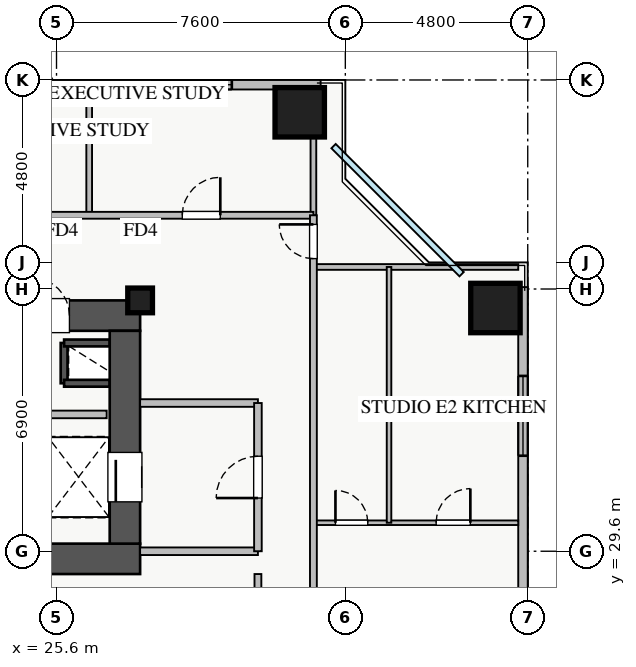
"""IFC4 building model, lengths in metres.
Left out: names, types, materials, properties, quantities, classifications, styles, units other than length and angle.
Written with IfcOpenShell. Run it as: python <this file> out.ifc"""

import sys

from ifc_helpers import new_model, si_unit, direction, frame, frame_2d, origin, origin_2d, place, context, subcontext, project, spatial, rectangle, extrude, source, transform, mapped, element, fill, save


model = new_model("IFC4")
c1 = context("Model", 3, precision=1e-05, world=origin(), true_north=direction((0.0, 1.0)))
c2 = subcontext(c1, "Body", "Model", "MODEL_VIEW")
j1 = project(units=[si_unit("LENGTHUNIT", "METRE"), si_unit("PLANEANGLEUNIT", "RADIAN")], contexts=[c1])
p1 = place(None, origin())
s1 = spatial("IfcSite", under=j1, at=p1, CompositionType="ELEMENT")
p2 = place(p1, origin())
s2 = spatial("IfcBuilding", under=s1, at=p2, CompositionType="ELEMENT")
p3 = place(p2, frame((0.0, 0.0, 63.25)))
s3 = spatial("IfcBuildingStorey", under=s2, at=p3, CompositionType="ELEMENT", Elevation=63.25)
p4 = place(p3, frame((25.8, 34.02, 0.0), z_axis=(0.0, 0.0, 1.0), x_axis=(0.0, 1.0, 0.0)))
e1 = element("IfcWall", 1, at=p4, inside=s3, PredefinedType="SHEAR", context=c2, shape_type="SweptSolid", body=[
    extrude(rectangle(XDim=1.06, YDim=0.18, at=frame_2d((0.53, 0.0))), origin(), (0.0, 0.0, 1.0), 3.07),
])
for number, where, z_axis, x_axis in (
    (2, (25.8, 35.08, 0.0), (0.0, 0.0, 1.0), (1.0, 0.0, 0.0)),
    (3, (25.8, 34.02, 0.0), (0.0, 0.0, 1.0), (1.0, 0.0, 0.0)),
):
    element("IfcWall", number, at=place(p3, frame(where, z_axis=z_axis, x_axis=x_axis)), inside=s3, PredefinedType="SHEAR", context=c2, shape_type="SweptSolid", body=[
        extrude(rectangle(XDim=1.2, YDim=0.18, at=frame_2d((0.6, 0.0))), origin(), (0.0, 0.0, 1.0), 3.07),
    ])
p5 = place(p3, frame((10.2, 29.4, 0.0), z_axis=(0.0, 0.0, 1.0), x_axis=(1.0, 0.0, 0.0)))
e4 = element("IfcWall", 4, at=p5, inside=s3, PredefinedType="SHEAR", context=c2, shape_type="SweptSolid", body=[
    extrude(rectangle(XDim=17.6, YDim=0.8, at=frame_2d((8.8, 0.0))), origin(), (0.0, 0.0, 1.0), 3.25),
])
p6 = place(p3, frame((10.2, 35.8, 0.0), z_axis=(0.0, 0.0, 1.0), x_axis=(1.0, 0.0, 0.0)))
e5 = element("IfcWall", 5, at=p6, inside=s3, PredefinedType="SHEAR", context=c2, shape_type="SweptSolid", body=[
    extrude(rectangle(XDim=17.6, YDim=0.8, at=frame_2d((8.8, 0.0))), origin(), (0.0, 0.0, 1.0), 3.25),
])
p7 = place(p6, frame((1.15, 0.0, 0.0)))
e6 = element("IfcOpeningElement", 6, at=p7, cuts=e5, PredefinedType="OPENING", context=c2, shape_type="SweptSolid", body=[
    extrude(rectangle(XDim=1.1, YDim=2.05, at=frame_2d((0.55, 1.025))), frame((0.0, 0.41, 0.0), z_axis=(0.0, -1.0, 0.0), x_axis=(1.0, 0.0, 0.0)), (0.0, 0.0, 1.0), 0.82),
])
p8 = place(p6, frame((8.3, 0.0, 0.0)))
e7 = element("IfcOpeningElement", 7, at=p8, cuts=e5, PredefinedType="OPENING", context=c2, shape_type="SweptSolid", body=[
    extrude(rectangle(XDim=1.1, YDim=2.05, at=frame_2d((0.55, 1.025))), frame((0.0, 0.41, 0.0), z_axis=(0.0, -1.0, 0.0), x_axis=(1.0, 0.0, 0.0)), (0.0, 0.0, 1.0), 0.82),
])
p9 = place(p6, frame((10.05, 0.0, 0.0)))
e8 = element("IfcOpeningElement", 8, at=p9, cuts=e5, PredefinedType="OPENING", context=c2, shape_type="SweptSolid", body=[
    extrude(rectangle(XDim=1.1, YDim=2.05, at=frame_2d((0.55, 1.025))), frame((0.0, 0.41, 0.0), z_axis=(0.0, -1.0, 0.0), x_axis=(1.0, 0.0, 0.0)), (0.0, 0.0, 1.0), 0.82),
])
p10 = place(p6, frame((14.74, 0.0, 0.0)))
e9 = element("IfcOpeningElement", 9, at=p10, cuts=e5, PredefinedType="OPENING", context=c2, shape_type="SweptSolid", body=[
    extrude(rectangle(XDim=1.0, YDim=2.05, at=frame_2d((0.5, 1.025))), frame((0.0, 0.41, 0.0), z_axis=(0.0, -1.0, 0.0), x_axis=(1.0, 0.0, 0.0)), (0.0, 0.0, 1.0), 0.82),
])
p11 = place(p6, frame((11.95, 0.0, 0.0)))
e10 = element("IfcOpeningElement", 10, at=p11, cuts=e5, PredefinedType="OPENING", context=c2, shape_type="SweptSolid", body=[
    extrude(rectangle(XDim=1.0, YDim=2.05, at=frame_2d((0.5, 1.025))), frame((0.0, 0.41, 0.0), z_axis=(0.0, -1.0, 0.0), x_axis=(1.0, 0.0, 0.0)), (0.0, 0.0, 1.0), 0.82),
])
p12 = place(p6, frame((13.485, 0.0, 0.0)))
e11 = element("IfcOpeningElement", 11, at=p12, cuts=e5, PredefinedType="OPENING", context=c2, shape_type="SweptSolid", body=[
    extrude(rectangle(XDim=1.0, YDim=2.05, at=frame_2d((0.5, 1.025))), frame((0.0, 0.41, 0.0), z_axis=(0.0, -1.0, 0.0), x_axis=(1.0, 0.0, 0.0)), (0.0, 0.0, 1.0), 0.82),
])
p13 = place(p3, frame((27.4, 29.8, 0.0), z_axis=(0.0, 0.0, 1.0), x_axis=(0.0, 1.0, 0.0)))
e12 = element("IfcWall", 12, at=p13, inside=s3, PredefinedType="SHEAR", context=c2, shape_type="SweptSolid", body=[
    extrude(rectangle(XDim=5.6, YDim=0.8, at=frame_2d((2.8, 0.0))), origin(), (0.0, 0.0, 1.0), 3.25),
])
p14 = place(p13, frame((1.1, 0.0, 0.0)))
e13 = element("IfcOpeningElement", 13, at=p14, cuts=e12, PredefinedType="OPENING", context=c2, shape_type="SweptSolid", body=[
    extrude(rectangle(XDim=1.3, YDim=2.05, at=frame_2d((0.65, 1.025))), frame((0.0, 0.41, 0.0), z_axis=(0.0, -1.0, 0.0), x_axis=(1.0, 0.0, 0.0)), (0.0, 0.0, 1.0), 0.82),
])
m1 = source(origin(), c2, "Body", "SweptSolid", [
    extrude(rectangle(XDim=0.65, YDim=0.65, at=origin_2d()), origin(), (0.0, 0.0, 1.0), 3.25),
])
p15 = place(p3, frame((27.8, 36.2, 0.0), z_axis=(0.0, 0.0, 1.0), x_axis=(1.0, 0.0, 0.0)))
e14 = element("IfcColumn", 14, at=p15, inside=s3, PredefinedType="PILASTER", context=c2, shape_type="MappedRepresentation", body=[
    mapped(m1, transform((0.0, 0.0, 0.0), x_axis=(1.0, 0.0, 0.0), y_axis=(0.0, 1.0, 0.0), z_axis=(0.0, 0.0, 1.0), scale=1.0)),
])
m2 = source(origin(), c2, "Body", "SweptSolid", [
    extrude(rectangle(XDim=1.3, YDim=1.3, at=origin_2d()), origin(), (0.0, 0.0, 1.0), 3.25),
])
for number, where, z_axis, x_axis in (
    (15, (37.15, 36.0, 0.0), (0.0, 0.0, 1.0), (1.0, 0.0, 0.0)),
    (16, (32.0, 41.15, 0.0), (0.0, 0.0, 1.0), (1.0, 0.0, 0.0)),
):
    element("IfcColumn", number, at=place(p3, frame(where, z_axis=z_axis, x_axis=x_axis)), inside=s3, PredefinedType="COLUMN", context=c2, shape_type="MappedRepresentation", body=[
        mapped(m2, transform((0.0, 0.0, 0.0), x_axis=(1.0, 0.0, 0.0), y_axis=(0.0, 1.0, 0.0), z_axis=(0.0, 0.0, 1.0), scale=1.0)),
    ])
p16 = place(p3, frame((5.45, 41.875, 0.0), z_axis=(0.0, 0.0, 1.0), x_axis=(1.0, 0.0, 0.0)))
e17 = element("IfcWall", 17, at=p16, inside=s3, PredefinedType="STANDARD", context=c2, shape_type="SweptSolid", body=[
    extrude(rectangle(XDim=27.1, YDim=0.25, at=frame_2d((13.55, 0.0))), origin(), (0.0, 0.0, 1.0), 2.61),
])
p17 = place(p16, frame((14.4, 0.0, 0.0)))
e18 = element("IfcOpeningElement", 18, at=p17, cuts=e17, PredefinedType="OPENING", context=c2, shape_type="SweptSolid", body=[
    extrude(rectangle(XDim=1.2, YDim=2.1, at=frame_2d((0.6, 1.05))), frame((0.0, 0.135, 0.0), z_axis=(0.0, -1.0, 0.0), x_axis=(1.0, 0.0, 0.0)), (0.0, 0.0, 1.0), 0.27),
])
p18 = place(p16, frame((1.465, 0.0, 0.9)))
e19 = element("IfcOpeningElement", 19, at=p18, cuts=e17, PredefinedType="OPENING", context=c2, shape_type="SweptSolid", body=[
    extrude(rectangle(XDim=1.5, YDim=1.5, at=frame_2d((0.75, 0.75))), frame((0.0, 0.135, 0.0), z_axis=(0.0, -1.0, 0.0), x_axis=(1.0, 0.0, 0.0)), (0.0, 0.0, 1.0), 0.27),
])
p19 = place(p16, frame((9.263, 0.0, 0.9)))
e20 = element("IfcOpeningElement", 20, at=p19, cuts=e17, PredefinedType="OPENING", context=c2, shape_type="SweptSolid", body=[
    extrude(rectangle(XDim=1.8, YDim=1.45, at=frame_2d((0.9, 0.725))), frame((0.0, 0.135, 0.0), z_axis=(0.0, -1.0, 0.0), x_axis=(1.0, 0.0, 0.0)), (0.0, 0.0, 1.0), 0.27),
])
p20 = place(p16, frame((17.93, 0.0, 0.9)))
e21 = element("IfcOpeningElement", 21, at=p20, cuts=e17, PredefinedType="OPENING", context=c2, shape_type="SweptSolid", body=[
    extrude(rectangle(XDim=1.5, YDim=1.5, at=frame_2d((0.75, 0.75))), frame((0.0, 0.135, 0.0), z_axis=(0.0, -1.0, 0.0), x_axis=(1.0, 0.0, 0.0)), (0.0, 0.0, 1.0), 0.27),
])
p21 = place(p16, frame((22.663, 0.0, 0.9)))
e22 = element("IfcOpeningElement", 22, at=p21, cuts=e17, PredefinedType="OPENING", context=c2, shape_type="SweptSolid", body=[
    extrude(rectangle(XDim=2.1, YDim=1.48, at=frame_2d((1.05, 0.74))), frame((0.0, 0.135, 0.0), z_axis=(0.0, -1.0, 0.0), x_axis=(1.0, 0.0, 0.0)), (0.0, 0.0, 1.0), 0.27),
])
p22 = place(p16, frame((4.63, 0.0, 0.9)))
e23 = element("IfcOpeningElement", 23, at=p22, cuts=e17, PredefinedType="OPENING", context=c2, shape_type="SweptSolid", body=[
    extrude(rectangle(XDim=2.4, YDim=1.5, at=frame_2d((1.2, 0.75))), frame((0.0, 0.135, 0.0), z_axis=(0.0, -1.0, 0.0), x_axis=(1.0, 0.0, 0.0)), (0.0, 0.0, 1.0), 0.27),
])
p23 = place(p3, frame((37.875, 9.45, 0.0), z_axis=(0.0, 0.0, 1.0), x_axis=(0.0, 1.0, 0.0)))
e24 = element("IfcWall", 24, at=p23, inside=s3, PredefinedType="STANDARD", context=c2, shape_type="SweptSolid", body=[
    extrude(rectangle(XDim=27.1, YDim=0.25, at=frame_2d((13.55, 0.0))), origin(), (0.0, 0.0, 1.0), 2.61),
])
p24 = place(p23, frame((14.4, 0.0, 0.0)))
e25 = element("IfcOpeningElement", 25, at=p24, cuts=e24, PredefinedType="OPENING", context=c2, shape_type="SweptSolid", body=[
    extrude(rectangle(XDim=1.2, YDim=2.1, at=frame_2d((0.6, 1.05))), frame((0.0, 0.135, 0.0), z_axis=(0.0, -1.0, 0.0), x_axis=(1.0, 0.0, 0.0)), (0.0, 0.0, 1.0), 0.27),
])
p25 = place(p23, frame((2.188, 0.0, 0.9)))
e26 = element("IfcOpeningElement", 26, at=p25, cuts=e24, PredefinedType="OPENING", context=c2, shape_type="SweptSolid", body=[
    extrude(rectangle(XDim=2.4, YDim=1.48, at=frame_2d((1.2, 0.74))), frame((0.0, 0.135, 0.0), z_axis=(0.0, -1.0, 0.0), x_axis=(1.0, 0.0, 0.0)), (0.0, 0.0, 1.0), 0.27),
])
p26 = place(p23, frame((22.663, 0.0, 0.9)))
e27 = element("IfcOpeningElement", 27, at=p26, cuts=e24, PredefinedType="OPENING", context=c2, shape_type="SweptSolid", body=[
    extrude(rectangle(XDim=2.1, YDim=1.48, at=frame_2d((1.05, 0.74))), frame((0.0, 0.135, 0.0), z_axis=(0.0, -1.0, 0.0), x_axis=(1.0, 0.0, 0.0)), (0.0, 0.0, 1.0), 0.27),
])
p27 = place(p23, frame((13.235, 0.0, 0.9)))
e28 = element("IfcOpeningElement", 28, at=p27, cuts=e24, PredefinedType="OPENING", context=c2, shape_type="SweptSolid", body=[
    extrude(rectangle(XDim=0.9, YDim=1.2, at=frame_2d((0.45, 0.6))), frame((0.0, 0.135, 0.0), z_axis=(0.0, -1.0, 0.0), x_axis=(1.0, 0.0, 0.0)), (0.0, 0.0, 1.0), 0.27),
])
for number, where, z_axis, x_axis in (
    (29, (27.8, 29.6, 0.0), (0.0, 0.0, 1.0), (1.0, 0.0, 0.0)),
    (30, (27.8, 33.5, 0.0), (0.0, 0.0, 1.0), (1.0, 0.0, 0.0)),
):
    element("IfcWall", number, at=place(p3, frame(where, z_axis=z_axis, x_axis=x_axis)), inside=s3, PredefinedType="PARTITIONING", context=c2, shape_type="SweptSolid", body=[
        extrude(rectangle(XDim=3.1, YDim=0.2, at=frame_2d((1.55, 0.0))), origin(), (0.0, 0.0, 1.0), 3.07),
    ])
p28 = place(p3, frame((30.9, 29.6, 0.0), z_axis=(0.0, 0.0, 1.0), x_axis=(0.0, 1.0, 0.0)))
e31 = element("IfcWall", 31, at=p28, inside=s3, PredefinedType="PARTITIONING", context=c2, shape_type="SweptSolid", body=[
    extrude(rectangle(XDim=3.9, YDim=0.2, at=frame_2d((1.95, 0.0))), origin(), (0.0, 0.0, 1.0), 3.07),
])
p29 = place(p28, frame((1.4, 0.0, 0.0)))
e32 = element("IfcOpeningElement", 32, at=p29, cuts=e31, PredefinedType="OPENING", context=c2, shape_type="SweptSolid", body=[
    extrude(rectangle(XDim=1.1, YDim=2.05, at=frame_2d((0.55, 1.025))), frame((0.0, 0.11, 0.0), z_axis=(0.0, -1.0, 0.0), x_axis=(1.0, 0.0, 0.0)), (0.0, 0.0, 1.0), 0.22),
])
p30 = place(p3, frame((21.75, 33.2, 0.0), z_axis=(0.0, 0.0, 1.0), x_axis=(1.0, 0.0, 0.0)))
e33 = element("IfcWall", 33, at=p30, inside=s3, PredefinedType="PARTITIONING", context=c2, shape_type="SweptSolid", body=[
    extrude(rectangle(XDim=5.17, YDim=0.2, at=frame_2d((2.585, 0.0))), origin(), (0.0, 0.0, 1.0), 3.07),
])
for number, where, z_axis, x_axis in (
    (34, (26.46, 38.44, 0.0), (0.0, 0.0, 1.0), (0.0, 1.0, 0.0)),
    (35, (32.36, 38.44, 0.0), (0.0, 0.0, 1.0), (0.0, 1.0, 0.0)),
):
    element("IfcWall", number, at=place(p3, frame(where, z_axis=z_axis, x_axis=x_axis)), inside=s3, PredefinedType="PARTITIONING", context=c2, shape_type="SweptSolid", body=[
        extrude(rectangle(XDim=3.31, YDim=0.15, at=frame_2d((1.655, 0.0))), origin(), (0.0, 0.0, 1.0), 3.07),
    ])
p31 = place(p3, frame((8.75, 38.44, 0.0), z_axis=(0.0, 0.0, 1.0), x_axis=(1.0, 0.0, 0.0)))
e36 = element("IfcWall", 36, at=p31, inside=s3, PredefinedType="PARTITIONING", context=c2, shape_type="SweptSolid", body=[
    extrude(rectangle(XDim=23.61, YDim=0.18, at=frame_2d((11.805, 0.0))), origin(), (0.0, 0.0, 1.0), 3.07),
])
p32 = place(p31, frame((2.03, 0.0, 0.0)))
e37 = element("IfcOpeningElement", 37, at=p32, cuts=e36, PredefinedType="OPENING", context=c2, shape_type="SweptSolid", body=[
    extrude(rectangle(XDim=1.0, YDim=2.05, at=frame_2d((0.5, 1.025))), frame((0.0, 0.1, 0.0), z_axis=(0.0, -1.0, 0.0), x_axis=(1.0, 0.0, 0.0)), (0.0, 0.0, 1.0), 0.2),
])
p33 = place(p31, frame((8.555, 0.0, 0.0)))
e38 = element("IfcOpeningElement", 38, at=p33, cuts=e36, PredefinedType="OPENING", context=c2, shape_type="SweptSolid", body=[
    extrude(rectangle(XDim=1.0, YDim=2.05, at=frame_2d((0.5, 1.025))), frame((0.0, 0.1, 0.0), z_axis=(0.0, -1.0, 0.0), x_axis=(1.0, 0.0, 0.0)), (0.0, 0.0, 1.0), 0.2),
])
p34 = place(p31, frame((14.88, 0.0, 0.0)))
e39 = element("IfcOpeningElement", 39, at=p34, cuts=e36, PredefinedType="OPENING", context=c2, shape_type="SweptSolid", body=[
    extrude(rectangle(XDim=1.0, YDim=2.05, at=frame_2d((0.5, 1.025))), frame((0.0, 0.1, 0.0), z_axis=(0.0, -1.0, 0.0), x_axis=(1.0, 0.0, 0.0)), (0.0, 0.0, 1.0), 0.2),
])
p35 = place(p31, frame((20.16, 0.0, 0.0)))
e40 = element("IfcOpeningElement", 40, at=p35, cuts=e36, PredefinedType="OPENING", context=c2, shape_type="SweptSolid", body=[
    extrude(rectangle(XDim=1.0, YDim=2.05, at=frame_2d((0.5, 1.025))), frame((0.0, 0.1, 0.0), z_axis=(0.0, -1.0, 0.0), x_axis=(1.0, 0.0, 0.0)), (0.0, 0.0, 1.0), 0.2),
])
p36 = place(p3, frame((32.36, 37.08, 0.0), z_axis=(0.0, 0.0, 1.0), x_axis=(1.0, 0.0, 0.0)))
e41 = element("IfcWall", 41, at=p36, inside=s3, PredefinedType="PARTITIONING", context=c2, shape_type="SweptSolid", body=[
    extrude(rectangle(XDim=5.39, YDim=0.15, at=frame_2d((2.695, 0.0))), origin(), (0.0, 0.0, 1.0), 3.07),
])
p37 = place(p3, frame((32.36, 30.35, 0.0), z_axis=(0.0, 0.0, 1.0), x_axis=(1.0, 0.0, 0.0)))
e42 = element("IfcWall", 42, at=p37, inside=s3, PredefinedType="PLUMBINGWALL", context=c2, shape_type="SweptSolid", body=[
    extrude(rectangle(XDim=5.39, YDim=0.12, at=frame_2d((2.695, 0.0))), origin(), (0.0, 0.0, 1.0), 3.07),
])
p38 = place(p37, frame((0.58, 0.0, 0.0)))
e43 = element("IfcOpeningElement", 43, at=p38, cuts=e42, PredefinedType="OPENING", context=c2, shape_type="SweptSolid", body=[
    extrude(rectangle(XDim=0.85, YDim=2.05, at=frame_2d((0.425, 1.025))), frame((0.0, 0.07, 0.0), z_axis=(0.0, -1.0, 0.0), x_axis=(1.0, 0.0, 0.0)), (0.0, 0.0, 1.0), 0.14),
])
p39 = place(p37, frame((3.23, 0.0, 0.0)))
e44 = element("IfcOpeningElement", 44, at=p39, cuts=e42, PredefinedType="OPENING", context=c2, shape_type="SweptSolid", body=[
    extrude(rectangle(XDim=0.9, YDim=2.05, at=frame_2d((0.45, 1.025))), frame((0.0, 0.07, 0.0), z_axis=(0.0, -1.0, 0.0), x_axis=(1.0, 0.0, 0.0)), (0.0, 0.0, 1.0), 0.14),
])
p40 = place(p3, frame((34.35, 30.35, 0.0), z_axis=(0.0, 0.0, 1.0), x_axis=(0.0, 1.0, 0.0)))
e45 = element("IfcWall", 45, at=p40, inside=s3, PredefinedType="PLUMBINGWALL", context=c2, shape_type="SweptSolid", body=[
    extrude(rectangle(XDim=6.73, YDim=0.12, at=frame_2d((3.365, 0.0))), origin(), (0.0, 0.0, 1.0), 3.07),
])
p41 = place(p3, frame((32.36, 7.21, 0.0), z_axis=(0.0, 0.0, 1.0), x_axis=(0.0, 1.0, 0.0)))
e46 = element("IfcWall", 46, at=p41, inside=s3, PredefinedType="PARTITIONING", context=c2, shape_type="SweptSolid", body=[
    extrude(rectangle(XDim=31.23, YDim=0.18, at=frame_2d((15.615, 0.0))), origin(), (0.0, 0.0, 1.0), 2.865),
])
p42 = place(p41, frame((30.09, 0.0, 0.0)))
e47 = element("IfcOpeningElement", 47, at=p42, cuts=e46, PredefinedType="OPENING", context=c2, shape_type="SweptSolid", body=[
    extrude(rectangle(XDim=0.9, YDim=2.05, at=frame_2d((0.45, 1.025))), frame((0.0, 0.1, 0.0), z_axis=(0.0, -1.0, 0.0), x_axis=(1.0, 0.0, 0.0)), (0.0, 0.0, 1.0), 0.2),
])
p43 = place(p41, frame((0.415, 0.0, 0.0)))
e48 = element("IfcOpeningElement", 48, at=p43, cuts=e46, PredefinedType="OPENING", context=c2, shape_type="SweptSolid", body=[
    extrude(rectangle(XDim=0.9, YDim=2.05, at=frame_2d((0.45, 1.025))), frame((0.0, 0.1, 0.0), z_axis=(0.0, -1.0, 0.0), x_axis=(1.0, 0.0, 0.0)), (0.0, 0.0, 1.0), 0.2),
])
p44 = place(p41, frame((7.975, 0.0, 0.0)))
e49 = element("IfcOpeningElement", 49, at=p44, cuts=e46, PredefinedType="OPENING", context=c2, shape_type="SweptSolid", body=[
    extrude(rectangle(XDim=1.0, YDim=2.05, at=frame_2d((0.5, 1.025))), frame((0.0, 0.1, 0.0), z_axis=(0.0, -1.0, 0.0), x_axis=(1.0, 0.0, 0.0)), (0.0, 0.0, 1.0), 0.2),
])
p45 = place(p41, frame((18.5, 0.0, 0.0)))
e50 = element("IfcOpeningElement", 50, at=p45, cuts=e46, PredefinedType="OPENING", context=c2, shape_type="SweptSolid", body=[
    extrude(rectangle(XDim=1.0, YDim=2.05, at=frame_2d((0.5, 1.025))), frame((0.0, 0.1, 0.0), z_axis=(0.0, -1.0, 0.0), x_axis=(1.0, 0.0, 0.0)), (0.0, 0.0, 1.0), 0.2),
])
p46 = place(p3, frame((30.9, 17.0, 0.0), z_axis=(0.0, 0.0, 1.0), x_axis=(0.0, 1.0, 0.0)))
e51 = element("IfcWall", 51, at=p46, inside=s3, PredefinedType="PARTITIONING", context=c2, shape_type="SweptSolid", body=[
    extrude(rectangle(XDim=12.0, YDim=0.18, at=frame_2d((6.0, 0.0))), origin(), (0.0, 0.0, 1.0), 3.07),
])
p47 = place(p46, frame((1.4, 0.0, 0.0)))
e52 = element("IfcOpeningElement", 52, at=p47, cuts=e51, PredefinedType="OPENING", context=c2, shape_type="SweptSolid", body=[
    extrude(rectangle(XDim=1.0, YDim=2.05, at=frame_2d((0.5, 1.025))), frame((0.0, 0.1, 0.0), z_axis=(0.0, -1.0, 0.0), x_axis=(1.0, 0.0, 0.0)), (0.0, 0.0, 1.0), 0.2),
])
p48 = place(p46, frame((5.4, 0.0, 0.0)))
e53 = element("IfcOpeningElement", 53, at=p48, cuts=e51, PredefinedType="OPENING", context=c2, shape_type="SweptSolid", body=[
    extrude(rectangle(XDim=1.0, YDim=2.05, at=frame_2d((0.5, 1.025))), frame((0.0, 0.1, 0.0), z_axis=(0.0, -1.0, 0.0), x_axis=(1.0, 0.0, 0.0)), (0.0, 0.0, 1.0), 0.2),
])
p49 = place(p46, frame((9.4, 0.0, 0.0)))
e54 = element("IfcOpeningElement", 54, at=p49, cuts=e51, PredefinedType="OPENING", context=c2, shape_type="SweptSolid", body=[
    extrude(rectangle(XDim=1.0, YDim=2.05, at=frame_2d((0.5, 1.025))), frame((0.0, 0.1, 0.0), z_axis=(0.0, -1.0, 0.0), x_axis=(1.0, 0.0, 0.0)), (0.0, 0.0, 1.0), 0.2),
])
m3 = source(origin(), c2, "Body", "SweptSolid", [
    extrude(rectangle(XDim=2.1, YDim=1.48, at=frame_2d((1.05, 0.74))), frame((0.0, 0.03, 0.0), z_axis=(0.0, -1.0, 0.0), x_axis=(1.0, 0.0, 0.0)), (0.0, 0.0, 1.0), 0.06),
])
p50 = place(p21, origin())
e55 = element("IfcWindow", 55, at=p50, inside=s3, PartitioningType="TRIPLE_PANEL_VERTICAL", PredefinedType="WINDOW", context=c2, shape_type="MappedRepresentation", body=[
    mapped(m3, transform((0.0, 0.0, 0.0), x_axis=(1.0, 0.0, 0.0), y_axis=(0.0, 1.0, 0.0), z_axis=(0.0, 0.0, 1.0), scale=1.0)),
])
fill(e22, e55)
p51 = place(p26, origin())
e56 = element("IfcWindow", 56, at=p51, inside=s3, PartitioningType="TRIPLE_PANEL_VERTICAL", PredefinedType="WINDOW", context=c2, shape_type="MappedRepresentation", body=[
    mapped(m3, transform((0.0, 0.0, 0.0), x_axis=(1.0, 0.0, 0.0), y_axis=(0.0, 1.0, 0.0), z_axis=(0.0, 0.0, 1.0), scale=1.0)),
])
fill(e27, e56)
m4 = source(origin(), c2, "Body", "SweptSolid", [
    extrude(rectangle(XDim=1.3, YDim=2.05, at=frame_2d((0.65, 1.025))), frame((0.0, 0.025, 0.0), z_axis=(0.0, -1.0, 0.0), x_axis=(1.0, 0.0, 0.0)), (0.0, 0.0, 1.0), 0.05),
])
p52 = place(p14, origin())
e57 = element("IfcDoor", 57, at=p52, inside=s3, OperationType="SLIDING_TO_LEFT", PredefinedType="DOOR", context=c2, shape_type="MappedRepresentation", body=[
    mapped(m4, transform((0.0, 0.0, 0.0), x_axis=(1.0, 0.0, 0.0), y_axis=(0.0, 1.0, 0.0), z_axis=(0.0, 0.0, 1.0), scale=1.0)),
])
fill(e13, e57)
m5 = source(origin(), c2, "Body", "SweptSolid", [
    extrude(rectangle(XDim=1.0, YDim=2.05, at=frame_2d((0.5, 1.025))), frame((0.0, 0.025, 0.0), z_axis=(0.0, -1.0, 0.0), x_axis=(1.0, 0.0, 0.0)), (0.0, 0.0, 1.0), 0.05),
])
p53 = place(p10, origin())
e58 = element("IfcDoor", 58, at=p53, inside=s3, OperationType="SINGLE_SWING_LEFT", PredefinedType="DOOR", context=c2, shape_type="MappedRepresentation", body=[
    mapped(m5, transform((0.0, 0.0, 0.0), x_axis=(1.0, 0.0, 0.0), y_axis=(0.0, 1.0, 0.0), z_axis=(0.0, 0.0, 1.0), scale=1.0)),
])
fill(e9, e58)
m6 = source(origin(), c2, "Body", "SweptSolid", [
    extrude(rectangle(XDim=1.1, YDim=2.05, at=frame_2d((0.55, 1.025))), frame((0.0, 0.025, 0.0), z_axis=(0.0, -1.0, 0.0), x_axis=(1.0, 0.0, 0.0)), (0.0, 0.0, 1.0), 0.05),
])
p54 = place(p29, origin())
e59 = element("IfcDoor", 59, at=p54, inside=s3, OperationType="SINGLE_SWING_LEFT", PredefinedType="DOOR", context=c2, shape_type="MappedRepresentation", body=[
    mapped(m6, transform((0.0, 0.0, 0.0), x_axis=(1.0, 0.0, 0.0), y_axis=(0.0, 1.0, 0.0), z_axis=(0.0, 0.0, 1.0), scale=1.0)),
])
fill(e32, e59)
p55 = place(p35, origin())
e60 = element("IfcDoor", 60, at=p55, inside=s3, OperationType="SINGLE_SWING_RIGHT", PredefinedType="DOOR", context=c2, shape_type="MappedRepresentation", body=[
    mapped(m5, transform((0.0, 0.0, 0.0), x_axis=(1.0, 0.0, 0.0), y_axis=(0.0, 1.0, 0.0), z_axis=(0.0, 0.0, 1.0), scale=1.0)),
])
fill(e40, e60)
m7 = source(origin(), c2, "Body", "SweptSolid", [
    extrude(rectangle(XDim=0.85, YDim=2.05, at=frame_2d((0.425, 1.025))), frame((0.0, 0.025, 0.0), z_axis=(0.0, -1.0, 0.0), x_axis=(1.0, 0.0, 0.0)), (0.0, 0.0, 1.0), 0.05),
])
p56 = place(p38, origin())
e61 = element("IfcDoor", 61, at=p56, inside=s3, OperationType="SINGLE_SWING_LEFT", PredefinedType="DOOR", context=c2, shape_type="MappedRepresentation", body=[
    mapped(m7, transform((0.0, 0.0, 0.0), x_axis=(1.0, 0.0, 0.0), y_axis=(0.0, 1.0, 0.0), z_axis=(0.0, 0.0, 1.0), scale=1.0)),
])
fill(e43, e61)
m8 = source(origin(), c2, "Body", "SweptSolid", [
    extrude(rectangle(XDim=0.9, YDim=2.05, at=frame_2d((0.45, 1.025))), frame((0.0, 0.025, 0.0), z_axis=(0.0, -1.0, 0.0), x_axis=(1.0, 0.0, 0.0)), (0.0, 0.0, 1.0), 0.05),
])
p57 = place(p39, origin())
e62 = element("IfcDoor", 62, at=p57, inside=s3, OperationType="SINGLE_SWING_RIGHT", PredefinedType="DOOR", context=c2, shape_type="MappedRepresentation", body=[
    mapped(m8, transform((0.0, 0.0, 0.0), x_axis=(1.0, 0.0, 0.0), y_axis=(0.0, 1.0, 0.0), z_axis=(0.0, 0.0, 1.0), scale=1.0)),
])
fill(e44, e62)
p58 = place(p42, origin())
e63 = element("IfcDoor", 63, at=p58, inside=s3, OperationType="SINGLE_SWING_RIGHT", PredefinedType="DOOR", context=c2, shape_type="MappedRepresentation", body=[
    mapped(m8, transform((0.0, 0.0, 0.0), x_axis=(1.0, 0.0, 0.0), y_axis=(0.0, 1.0, 0.0), z_axis=(0.0, 0.0, 1.0), scale=1.0)),
])
fill(e47, e63)
save(model, sys.argv[1])
